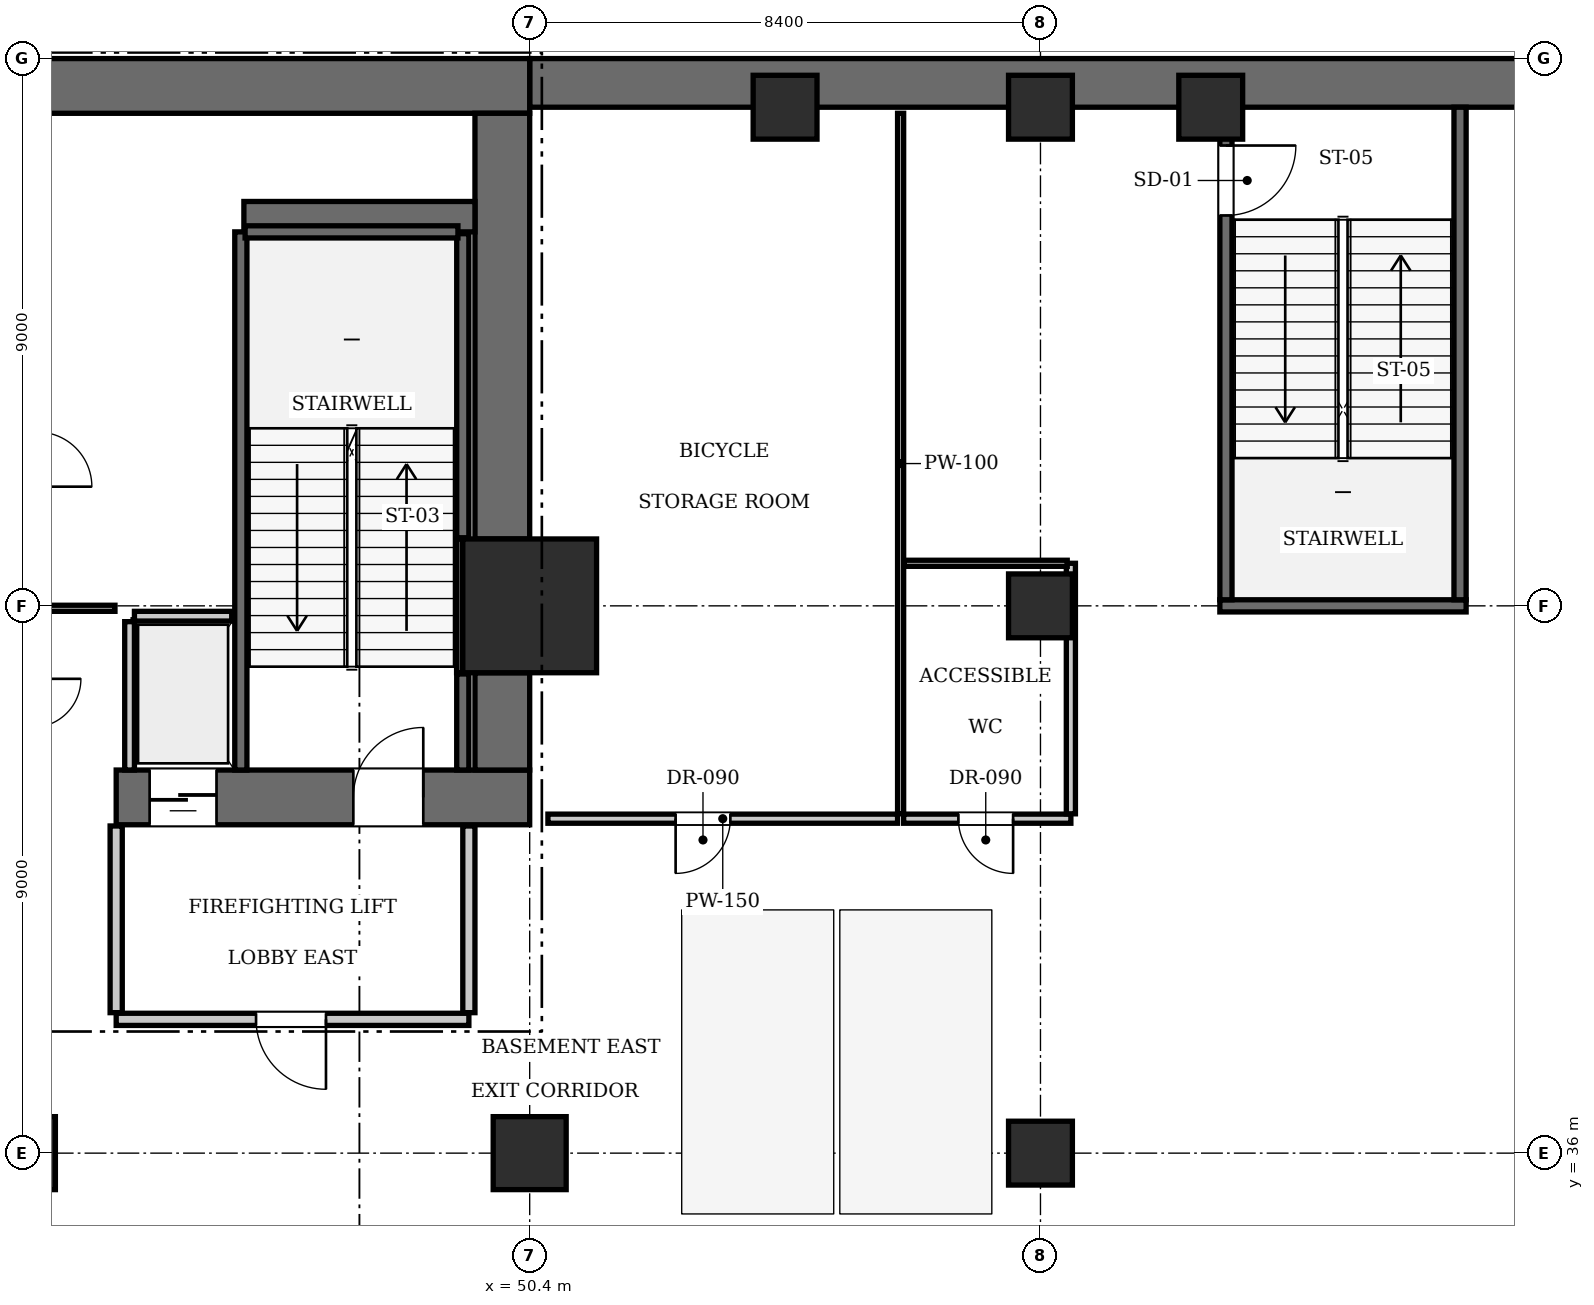
"""IFC4 building model, lengths in metres.
Left out: names, types, materials, properties, quantities, classifications, styles, units other than length and angle.
Written with IfcOpenShell. Run it as: python <this file> out.ifc"""

import sys

from ifc_helpers import new_model, si_unit, direction, frame, frame_2d, origin, origin_2d, place, context, subcontext, project, spatial, rectangle, extrude, element, fill, save


model = new_model("IFC4")
c1 = context("Model", 3, precision=1e-05, world=origin(), true_north=direction((0.0, 1.0)))
c2 = subcontext(c1, "Body", "Model", "MODEL_VIEW")
j1 = project(units=[si_unit("LENGTHUNIT", "METRE"), si_unit("PLANEANGLEUNIT", "RADIAN")], contexts=[c1])
p1 = place(None, origin())
s1 = spatial("IfcSite", under=j1, at=p1, CompositionType="ELEMENT")
p2 = place(p1, origin())
s2 = spatial("IfcBuilding", under=s1, at=p2, CompositionType="ELEMENT")
p3 = place(p2, frame((0.0, 0.0, -5.25)))
s3 = spatial("IfcBuildingStorey", under=s2, at=p3, CompositionType="ELEMENT", Elevation=-5.25)
p4 = place(p3, frame((50.4, 53.6, 0.0), z_axis=(0.0, 0.0, 1.0), x_axis=(1.0, 0.0, 0.0)))
e1 = element("IfcWall", 1, at=p4, inside=s3, PredefinedType="USERDEFINED", context=c2, shape_type="SweptSolid", body=[
    extrude(rectangle(XDim=25.2, YDim=0.8, at=frame_2d((12.6, 0.0))), origin(), (0.0, 0.0, 1.0), 5.25),
])
p5 = place(p3, frame((50.4, 45.0, 0.0), z_axis=(0.0, 0.0, 1.0), x_axis=(1.0, 0.0, 0.0)))
e2 = element("IfcColumn", 2, at=p5, inside=s3, PredefinedType="COLUMN", context=c2, shape_type="SweptSolid", body=[
    extrude(rectangle(XDim=2.2, YDim=2.2, at=origin_2d()), origin(), (0.0, 0.0, 1.0), 5.25),
])
p6 = place(p3, frame((25.2, 53.55, 0.0), z_axis=(0.0, 0.0, 1.0), x_axis=(1.0, 0.0, 0.0)))
e3 = element("IfcWall", 3, at=p6, inside=s3, PredefinedType="SHEAR", context=c2, shape_type="SweptSolid", body=[
    extrude(rectangle(XDim=25.2, YDim=0.9, at=frame_2d((12.6, 0.0))), origin(), (0.0, 0.0, 1.0), 5.25),
])
p7 = place(p3, frame((43.6, 41.85, 0.0), z_axis=(0.0, 0.0, 1.0), x_axis=(1.0, 0.0, 0.0)))
e4 = element("IfcWall", 4, at=p7, inside=s3, PredefinedType="SHEAR", context=c2, shape_type="SweptSolid", body=[
    extrude(rectangle(XDim=6.8, YDim=0.9, at=frame_2d((3.4, 0.0))), origin(), (0.0, 0.0, 1.0), 5.25),
])
p8 = place(p7, frame((3.9, 0.0, 0.0)))
e5 = element("IfcOpeningElement", 5, at=p8, cuts=e4, PredefinedType="OPENING", context=c2, shape_type="SweptSolid", body=[
    extrude(rectangle(XDim=1.15, YDim=2.15, at=frame_2d((0.575, 1.075))), frame((0.0, 0.46, 0.0), z_axis=(0.0, -1.0, 0.0), x_axis=(1.0, 0.0, 0.0)), (0.0, 0.0, 1.0), 0.92),
])
p9 = place(p7, frame((0.55, 0.0, 0.0)))
e6 = element("IfcOpeningElement", 6, at=p9, cuts=e4, PredefinedType="OPENING", context=c2, shape_type="SweptSolid", body=[
    extrude(rectangle(XDim=1.1, YDim=2.2, at=frame_2d((0.55, 1.1))), frame((0.0, 0.46, 0.0), z_axis=(0.0, -1.0, 0.0), x_axis=(1.0, 0.0, 0.0)), (0.0, 0.0, 1.0), 0.92),
])
p10 = place(p3, frame((49.95, 42.3, 0.0), z_axis=(0.0, 0.0, 1.0), x_axis=(0.0, 1.0, 0.0)))
e7 = element("IfcWall", 7, at=p10, inside=s3, PredefinedType="SHEAR", context=c2, shape_type="SweptSolid", body=[
    extrude(rectangle(XDim=1.6, YDim=0.9, at=frame_2d((0.8, 0.0))), origin(), (0.0, 0.0, 1.0), 5.25),
])
p11 = place(p3, frame((49.95, 46.1, 0.0), z_axis=(0.0, 0.0, 1.0), x_axis=(0.0, 1.0, 0.0)))
e8 = element("IfcWall", 8, at=p11, inside=s3, PredefinedType="SHEAR", context=c2, shape_type="SweptSolid", body=[
    extrude(rectangle(XDim=7.0, YDim=0.9, at=frame_2d((3.5, 0.0))), origin(), (0.0, 0.0, 1.0), 5.25),
])
p12 = place(p3, frame((45.7, 51.4, 0.0), z_axis=(0.0, 0.0, 1.0), x_axis=(1.0, 0.0, 0.0)))
e9 = element("IfcWall", 9, at=p12, inside=s3, PredefinedType="SHEAR", context=c2, shape_type="SweptSolid", body=[
    extrude(rectangle(XDim=3.8, YDim=0.5, at=frame_2d((1.9, 0.0))), origin(), (0.0, 0.0, 1.0), 5.25),
])
for number, where, z_axis, x_axis in (
    (10, (42.0, 36.0, 0.0), (0.0, 0.0, 1.0), (1.0, 0.0, 0.0)),
    (11, (50.4, 36.0, 0.0), (0.0, 0.0, 1.0), (1.0, 0.0, 0.0)),
):
    element("IfcColumn", number, at=place(p3, frame(where, z_axis=z_axis, x_axis=x_axis)), inside=s3, PredefinedType="COLUMN", context=c2, shape_type="SweptSolid", body=[
        extrude(rectangle(XDim=1.2, YDim=1.2, at=origin_2d()), origin(), (0.0, 0.0, 1.0), 5.25),
    ])
for number, where, z_axis, x_axis in (
    (12, (58.8, 36.0, 0.0), (0.0, 0.0, 1.0), (1.0, 0.0, 0.0)),
    (13, (58.8, 45.0, 0.0), (0.0, 0.0, 1.0), (1.0, 0.0, 0.0)),
    (14, (58.8, 53.2, 0.0), (0.0, 0.0, 1.0), (1.0, 0.0, 0.0)),
    (15, (54.6, 53.2, 0.0), (0.0, 0.0, 1.0), (1.0, 0.0, 0.0)),
    (16, (61.6, 53.2, 0.0), (0.0, 0.0, 1.0), (1.0, 0.0, 0.0)),
):
    element("IfcColumn", number, at=place(p3, frame(where, z_axis=z_axis, x_axis=x_axis)), inside=s3, PredefinedType="COLUMN", context=c2, shape_type="SweptSolid", body=[
        extrude(rectangle(XDim=1.05, YDim=1.05, at=origin_2d()), origin(), (0.0, 0.0, 1.0), 5.25),
    ])
p13 = place(p3, frame((45.65, 42.3, 0.0), z_axis=(0.0, 0.0, 1.0), x_axis=(0.0, 1.0, 0.0)))
e17 = element("IfcWall", 17, at=p13, inside=s3, PredefinedType="SOLIDWALL", context=c2, shape_type="SweptSolid", body=[
    extrude(rectangle(XDim=8.85, YDim=0.2, at=frame_2d((4.425, 0.0))), origin(), (0.0, 0.0, 1.0), 4.97),
])
p14 = place(p3, frame((49.3, 42.3, 0.0), z_axis=(0.0, 0.0, 1.0), x_axis=(0.0, 1.0, 0.0)))
e18 = element("IfcWall", 18, at=p14, inside=s3, PredefinedType="SOLIDWALL", context=c2, shape_type="SweptSolid", body=[
    extrude(rectangle(XDim=1.58, YDim=0.2, at=frame_2d((0.79, 0.0))), origin(), (0.0, 0.0, 1.0), 4.97),
])
p15 = place(p3, frame((49.3, 46.12, 0.0), z_axis=(0.0, 0.0, 1.0), x_axis=(0.0, 1.0, 0.0)))
e19 = element("IfcWall", 19, at=p15, inside=s3, PredefinedType="SOLIDWALL", context=c2, shape_type="SweptSolid", body=[
    extrude(rectangle(XDim=5.0, YDim=0.2, at=frame_2d((2.5, 0.0))), origin(), (0.0, 0.0, 1.0), 4.97),
])
p16 = place(p3, frame((45.72, 51.15, 0.0), z_axis=(0.0, 0.0, 1.0), x_axis=(1.0, 0.0, 0.0)))
e20 = element("IfcWall", 20, at=p16, inside=s3, PredefinedType="SOLIDWALL", context=c2, shape_type="SweptSolid", body=[
    extrude(rectangle(XDim=3.5, YDim=0.2, at=frame_2d((1.75, 0.0))), origin(), (0.0, 0.0, 1.0), 4.97),
])
p17 = place(p3, frame((49.248, 43.9, 0.0), z_axis=(0.0, 0.0, 1.0), x_axis=(0.0, 1.0, 0.0)))
e21 = element("IfcWall", 21, at=p17, inside=s3, PredefinedType="SOLIDWALL", context=c2, shape_type="SweptSolid", body=[
    extrude(rectangle(XDim=2.2, YDim=0.1, at=frame_2d((1.1, 0.0))), origin(), (0.0, 0.0, 1.0), 4.97),
])
p18 = place(p3, frame((61.75, 45.0, 0.0), z_axis=(0.0, 0.0, 1.0), x_axis=(1.0, 0.0, 0.0)))
e22 = element("IfcWall", 22, at=p18, inside=s3, PredefinedType="SOLIDWALL", context=c2, shape_type="SweptSolid", body=[
    extrude(rectangle(XDim=4.05, YDim=0.2, at=frame_2d((2.025, 0.0))), origin(), (0.0, 0.0, 1.0), 4.335),
])
p19 = place(p3, frame((61.85, 45.1, 0.0), z_axis=(0.0, 0.0, 1.0), x_axis=(0.0, 1.0, 0.0)))
e23 = element("IfcWall", 23, at=p19, inside=s3, PredefinedType="SOLIDWALL", context=c2, shape_type="SweptSolid", body=[
    extrude(rectangle(XDim=8.1, YDim=0.2, at=frame_2d((4.05, 0.0))), origin(), (0.0, 0.0, 1.0), 4.97),
])
p20 = place(p19, frame((6.32, 0.0, 0.0)))
e24 = element("IfcOpeningElement", 24, at=p20, cuts=e23, PredefinedType="OPENING", context=c2, shape_type="SweptSolid", body=[
    extrude(rectangle(XDim=1.15, YDim=2.15, at=frame_2d((0.575, 1.075))), frame((0.0, 0.11, 0.0), z_axis=(0.0, -1.0, 0.0), x_axis=(1.0, 0.0, 0.0)), (0.0, 0.0, 1.0), 0.22),
])
p21 = place(p3, frame((65.7, 45.1, 0.0), z_axis=(0.0, 0.0, 1.0), x_axis=(0.0, 1.0, 0.0)))
e25 = element("IfcWall", 25, at=p21, inside=s3, PredefinedType="SOLIDWALL", context=c2, shape_type="SweptSolid", body=[
    extrude(rectangle(XDim=8.1, YDim=0.2, at=frame_2d((4.05, 0.0))), origin(), (0.0, 0.0, 1.0), 4.97),
])
p22 = place(p3, frame((43.9, 44.83, 0.0), z_axis=(0.0, 0.0, 1.0), x_axis=(1.0, 0.0, 0.0)))
e26 = element("IfcWall", 26, at=p22, inside=s3, PredefinedType="SOLIDWALL", context=c2, shape_type="SweptSolid", body=[
    extrude(rectangle(XDim=1.6, YDim=0.16, at=frame_2d((0.8, 0.0))), origin(), (0.0, 0.0, 1.0), 4.97),
])
p23 = place(p3, frame((43.82, 42.3, 0.0), z_axis=(0.0, 0.0, 1.0), x_axis=(0.0, 1.0, 0.0)))
e27 = element("IfcWall", 27, at=p23, inside=s3, PredefinedType="SOLIDWALL", context=c2, shape_type="SweptSolid", body=[
    extrude(rectangle(XDim=2.44, YDim=0.16, at=frame_2d((1.22, 0.0))), origin(), (0.0, 0.0, 1.0), 4.97),
])
p24 = place(p3, frame((43.6, 38.2, 0.0), z_axis=(0.0, 0.0, 1.0), x_axis=(1.0, 0.0, 0.0)))
e28 = element("IfcWall", 28, at=p24, inside=s3, PredefinedType="PARTITIONING", context=c2, shape_type="SweptSolid", body=[
    extrude(rectangle(XDim=5.8, YDim=0.2, at=frame_2d((2.9, 0.0))), origin(), (0.0, 0.0, 1.0), 4.97),
])
p25 = place(p24, frame((2.3, 0.0, 0.0)))
e29 = element("IfcOpeningElement", 29, at=p25, cuts=e28, PredefinedType="OPENING", context=c2, shape_type="SweptSolid", body=[
    extrude(rectangle(XDim=1.15, YDim=2.15, at=frame_2d((0.575, 1.075))), frame((0.0, 0.11, 0.0), z_axis=(0.0, -1.0, 0.0), x_axis=(1.0, 0.0, 0.0)), (0.0, 0.0, 1.0), 0.22),
])
for number, where, z_axis, x_axis in (
    (30, (43.6, 38.31, 0.0), (0.0, 0.0, 1.0), (0.0, 1.0, 0.0)),
    (31, (49.4, 38.31, 0.0), (0.0, 0.0, 1.0), (0.0, 1.0, 0.0)),
):
    element("IfcWall", number, at=place(p3, frame(where, z_axis=z_axis, x_axis=x_axis)), inside=s3, PredefinedType="PARTITIONING", context=c2, shape_type="SweptSolid", body=[
        extrude(rectangle(XDim=3.07, YDim=0.2, at=frame_2d((1.535, 0.0))), origin(), (0.0, 0.0, 1.0), 4.97),
    ])
p26 = place(p3, frame((42.28, 44.96, 0.0), z_axis=(0.0, 0.0, 1.0), x_axis=(1.0, 0.0, 0.0)))
e32 = element("IfcWall", 32, at=p26, inside=s3, PredefinedType="PARTITIONING", context=c2, shape_type="SweptSolid", body=[
    extrude(rectangle(XDim=1.3, YDim=0.1, at=frame_2d((0.65, 0.0))), origin(), (0.0, 0.0, 1.0), 4.97),
])
p27 = place(p3, frame((50.7, 41.5, 0.0), z_axis=(0.0, 0.0, 1.0), x_axis=(1.0, 0.0, 0.0)))
e33 = element("IfcWall", 33, at=p27, inside=s3, PredefinedType="PARTITIONING", context=c2, shape_type="SweptSolid", body=[
    extrude(rectangle(XDim=5.75, YDim=0.15, at=frame_2d((2.875, 0.0))), origin(), (0.0, 0.0, 1.0), 4.97),
])
p28 = place(p27, frame((2.1, 0.0, 0.0)))
e34 = element("IfcOpeningElement", 34, at=p28, cuts=e33, PredefinedType="OPENING", context=c2, shape_type="SweptSolid", body=[
    extrude(rectangle(XDim=0.9, YDim=2.1, at=frame_2d((0.45, 1.05))), frame((0.0, 0.085, 0.0), z_axis=(0.0, -1.0, 0.0), x_axis=(1.0, 0.0, 0.0)), (0.0, 0.0, 1.0), 0.17),
])
p29 = place(p3, frame((56.55, 41.5, 0.0), z_axis=(0.0, 0.0, 1.0), x_axis=(1.0, 0.0, 0.0)))
e35 = element("IfcWall", 35, at=p29, inside=s3, PredefinedType="PARTITIONING", context=c2, shape_type="SweptSolid", body=[
    extrude(rectangle(XDim=2.75, YDim=0.15, at=frame_2d((1.375, 0.0))), origin(), (0.0, 0.0, 1.0), 4.97),
])
p30 = place(p29, frame((0.9, 0.0, 0.0)))
e36 = element("IfcOpeningElement", 36, at=p30, cuts=e35, PredefinedType="OPENING", context=c2, shape_type="SweptSolid", body=[
    extrude(rectangle(XDim=0.9, YDim=2.1, at=frame_2d((0.45, 1.05))), frame((0.0, 0.085, 0.0), z_axis=(0.0, -1.0, 0.0), x_axis=(1.0, 0.0, 0.0)), (0.0, 0.0, 1.0), 0.17),
])
p31 = place(p3, frame((56.5, 41.58, 0.0), z_axis=(0.0, 0.0, 1.0), x_axis=(0.0, 1.0, 0.0)))
e37 = element("IfcWall", 37, at=p31, inside=s3, PredefinedType="PARTITIONING", context=c2, shape_type="SweptSolid", body=[
    extrude(rectangle(XDim=11.52, YDim=0.1, at=frame_2d((5.76, 0.0))), origin(), (0.0, 0.0, 1.0), 4.97),
])
p32 = place(p3, frame((59.3, 41.58, 0.0), z_axis=(0.0, 0.0, 1.0), x_axis=(0.0, 1.0, 0.0)))
e38 = element("IfcWall", 38, at=p32, inside=s3, PredefinedType="PARTITIONING", context=c2, shape_type="SweptSolid", body=[
    extrude(rectangle(XDim=4.12, YDim=0.15, at=frame_2d((2.06, 0.0))), origin(), (0.0, 0.0, 1.0), 4.97),
])
p33 = place(p3, frame((56.56, 45.7, 0.0), z_axis=(0.0, 0.0, 1.0), x_axis=(1.0, 0.0, 0.0)))
e39 = element("IfcWall", 39, at=p33, inside=s3, PredefinedType="PARTITIONING", context=c2, shape_type="SweptSolid", body=[
    extrude(rectangle(XDim=2.68, YDim=0.1, at=frame_2d((1.34, 0.0))), origin(), (0.0, 0.0, 1.0), 4.97),
])
p34 = place(p8, origin())
e40 = element("IfcDoor", 40, at=p34, inside=s3, OperationType="SINGLE_SWING_RIGHT", PredefinedType="DOOR", context=c2, shape_type="SweptSolid", body=[
    extrude(rectangle(XDim=1.15, YDim=2.15, at=frame_2d((0.575, 1.075))), frame((0.0, 0.025, 0.0), z_axis=(0.0, -1.0, 0.0), x_axis=(1.0, 0.0, 0.0)), (0.0, 0.0, 1.0), 0.05),
])
fill(e5, e40)
p35 = place(p20, frame((1.15, 0.0, 0.0), z_axis=(0.0, 0.0, 1.0), x_axis=(-1.0, 0.0, 0.0)))
e41 = element("IfcDoor", 41, at=p35, inside=s3, OperationType="SINGLE_SWING_LEFT", PredefinedType="DOOR", context=c2, shape_type="SweptSolid", body=[
    extrude(rectangle(XDim=1.15, YDim=2.15, at=frame_2d((0.575, 1.075))), frame((0.0, 0.025, 0.0), z_axis=(0.0, -1.0, 0.0), x_axis=(1.0, 0.0, 0.0)), (0.0, 0.0, 1.0), 0.05),
])
fill(e24, e41)
p36 = place(p9, frame((1.1, 0.0, 0.0), z_axis=(0.0, 0.0, 1.0), x_axis=(-1.0, 0.0, 0.0)))
e42 = element("IfcDoor", 42, at=p36, inside=s3, OperationType="SLIDING_TO_LEFT", PredefinedType="DOOR", context=c2, shape_type="SweptSolid", body=[
    extrude(rectangle(XDim=1.1, YDim=2.2, at=frame_2d((0.55, 1.1))), frame((0.0, 0.025, 0.0), z_axis=(0.0, -1.0, 0.0), x_axis=(1.0, 0.0, 0.0)), (0.0, 0.0, 1.0), 0.05),
])
fill(e6, e42)
p37 = place(p25, frame((1.15, 0.0, 0.0), z_axis=(0.0, 0.0, 1.0), x_axis=(-1.0, 0.0, 0.0)))
e43 = element("IfcDoor", 43, at=p37, inside=s3, OperationType="SINGLE_SWING_LEFT", PredefinedType="DOOR", context=c2, shape_type="SweptSolid", body=[
    extrude(rectangle(XDim=1.15, YDim=2.15, at=frame_2d((0.575, 1.075))), frame((0.0, 0.025, 0.0), z_axis=(0.0, -1.0, 0.0), x_axis=(1.0, 0.0, 0.0)), (0.0, 0.0, 1.0), 0.05),
])
fill(e29, e43)
p38 = place(p28, frame((0.9, 0.0, 0.0), z_axis=(0.0, 0.0, 1.0), x_axis=(-1.0, 0.0, 0.0)))
e44 = element("IfcDoor", 44, at=p38, inside=s3, OperationType="SINGLE_SWING_RIGHT", PredefinedType="DOOR", context=c2, shape_type="SweptSolid", body=[
    extrude(rectangle(XDim=0.9, YDim=2.1, at=frame_2d((0.45, 1.05))), frame((0.0, 0.025, 0.0), z_axis=(0.0, -1.0, 0.0), x_axis=(1.0, 0.0, 0.0)), (0.0, 0.0, 1.0), 0.05),
])
fill(e34, e44)
p39 = place(p30, frame((0.9, 0.0, 0.0), z_axis=(0.0, 0.0, 1.0), x_axis=(-1.0, 0.0, 0.0)))
e45 = element("IfcDoor", 45, at=p39, inside=s3, OperationType="SINGLE_SWING_LEFT", PredefinedType="DOOR", context=c2, shape_type="SweptSolid", body=[
    extrude(rectangle(XDim=0.9, YDim=2.1, at=frame_2d((0.45, 1.05))), frame((0.0, 0.025, 0.0), z_axis=(0.0, -1.0, 0.0), x_axis=(1.0, 0.0, 0.0)), (0.0, 0.0, 1.0), 0.05),
])
fill(e36, e45)
save(model, sys.argv[1])
